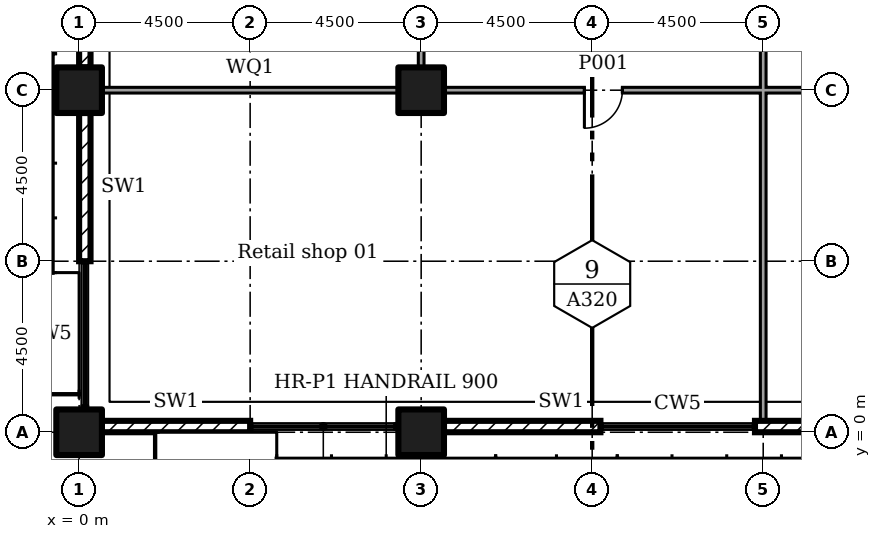
"""IFC4 building model, lengths in metres.
Left out: names, types, materials, properties, quantities, classifications, styles, units other than length and angle.
Written with IfcOpenShell. Run it as: python <this file> out.ifc"""

import sys

from ifc_helpers import new_model, si_unit, direction, frame, frame_2d, origin, origin_2d, place, context, subcontext, project, spatial, rectangle, extrude, element, fill, save


model = new_model("IFC4")
c1 = context("Model", 3, precision=1e-05, world=origin(), true_north=direction((0.0, 1.0)))
c2 = subcontext(c1, "Body", "Model", "MODEL_VIEW")
j1 = project(units=[si_unit("LENGTHUNIT", "METRE"), si_unit("PLANEANGLEUNIT", "RADIAN")], contexts=[c1])
p1 = place(None, origin())
s1 = spatial("IfcSite", under=j1, at=p1, CompositionType="ELEMENT")
p2 = place(p1, origin())
s2 = spatial("IfcBuilding", under=s1, at=p2, CompositionType="ELEMENT")
p3 = place(p2, origin())
s3 = spatial("IfcBuildingStorey", under=s2, at=p3, CompositionType="ELEMENT", Elevation=0.0)
for number, where in (
    (1, (0.0, 0.0, 0.0)),
    (2, (0.0, 9.0, 0.0)),
    (3, (9.0, 0.0, 0.0)),
    (4, (9.0, 9.0, 0.0)),
):
    element("IfcColumn", number, at=place(p3, frame(where)), inside=s3, PredefinedType="COLUMN", context=c2, shape_type="SweptSolid", body=[
        extrude(rectangle(XDim=1.2, YDim=1.2, at=origin_2d()), origin(), (0.0, 0.0, 1.0), 6.0),
    ])
p4 = place(p3, frame((0.6, 0.15, 0.0)))
e5 = element("IfcWall", 5, at=p4, inside=s3, PredefinedType="ELEMENTEDWALL", context=c2, shape_type="SweptSolid", body=[
    extrude(rectangle(XDim=3.9, YDim=0.3, at=frame_2d((1.95, 0.0))), origin(), (0.0, 0.0, 1.0), 5.55),
])
for number, where in (
    (6, (9.6, 0.15, 0.0)),
    (7, (17.783, 0.15, 0.0)),
):
    element("IfcWall", number, at=place(p3, frame(where)), inside=s3, PredefinedType="ELEMENTEDWALL", context=c2, shape_type="SweptSolid", body=[
        extrude(rectangle(XDim=4.116, YDim=0.3, at=frame_2d((2.058, 0.0))), origin(), (0.0, 0.0, 1.0), 5.55),
    ])
p5 = place(p3, frame((0.15, 13.717, 0.0), z_axis=(0.0, 0.0, 1.0), x_axis=(0.0, -1.0, 0.0)))
e8 = element("IfcWall", 8, at=p5, inside=s3, PredefinedType="ELEMENTEDWALL", context=c2, shape_type="SweptSolid", body=[
    extrude(rectangle(XDim=4.116, YDim=0.3, at=frame_2d((2.058, 0.0))), origin(), (0.0, 0.0, 1.0), 5.55),
])
p6 = place(p3, frame((0.15, 8.4, 0.0), z_axis=(0.0, 0.0, 1.0), x_axis=(0.0, -1.0, 0.0)))
e9 = element("IfcWall", 9, at=p6, inside=s3, PredefinedType="ELEMENTEDWALL", context=c2, shape_type="SweptSolid", body=[
    extrude(rectangle(XDim=3.9, YDim=0.3, at=frame_2d((1.95, 0.0))), origin(), (0.0, 0.0, 1.0), 5.55),
])
p7 = place(p3, frame((18.0, 0.3, 0.0), z_axis=(0.0, 0.0, 1.0), x_axis=(0.0, 1.0, 0.0)))
e10 = element("IfcWall", 10, at=p7, inside=s3, PredefinedType="PARTITIONING", context=c2, shape_type="SweptSolid", body=[
    extrude(rectangle(XDim=8.775, YDim=0.15, at=frame_2d((4.387, 0.0))), origin(), (0.0, 0.0, 1.0), 5.55),
])
p8 = place(p3, frame((9.595, 9.0, 0.0)))
e11 = element("IfcWall", 11, at=p8, inside=s3, PredefinedType="PARTITIONING", context=c2, shape_type="SweptSolid", body=[
    extrude(rectangle(XDim=8.48, YDim=0.15, at=frame_2d((4.24, 0.0))), origin(), (0.0, 0.0, 1.0), 5.55),
])
p9 = place(p8, frame((3.7, 0.0, 0.0)))
e12 = element("IfcOpeningElement", 12, at=p9, cuts=e11, PredefinedType="OPENING", context=c2, shape_type="SweptSolid", body=[
    extrude(rectangle(XDim=1.0, YDim=2.1, at=frame_2d((0.5, 1.05))), frame((0.0, 0.085, 0.0), z_axis=(0.0, -1.0, 0.0), x_axis=(1.0, 0.0, 0.0)), (0.0, 0.0, 1.0), 0.17),
])
p10 = place(p3, frame((0.595, 9.0, 0.0)))
e13 = element("IfcWall", 13, at=p10, inside=s3, PredefinedType="PARTITIONING", context=c2, shape_type="SweptSolid", body=[
    extrude(rectangle(XDim=7.81, YDim=0.15, at=frame_2d((3.905, 0.0))), origin(), (0.0, 0.0, 1.0), 5.55),
])
p11 = place(p3, frame((18.075, 9.0, 0.0)))
e14 = element("IfcWall", 14, at=p11, inside=s3, PredefinedType="PARTITIONING", context=c2, shape_type="SweptSolid", body=[
    extrude(rectangle(XDim=3.83, YDim=0.15, at=frame_2d((1.915, 0.0))), origin(), (0.0, 0.0, 1.0), 5.55),
])
p12 = place(p3, frame((18.0, 9.075, 0.0), z_axis=(0.0, 0.0, 1.0), x_axis=(0.0, 1.0, 0.0)))
e15 = element("IfcWall", 15, at=p12, inside=s3, PredefinedType="PARTITIONING", context=c2, shape_type="SweptSolid", body=[
    extrude(rectangle(XDim=9.0, YDim=0.15, at=frame_2d((4.5, 0.0))), origin(), (0.0, 0.0, 1.0), 5.55),
])
p13 = place(p12, frame((3.525, 0.0, 0.0)))
e16 = element("IfcOpeningElement", 16, at=p13, cuts=e15, PredefinedType="OPENING", context=c2, shape_type="SweptSolid", body=[
    extrude(rectangle(XDim=1.8, YDim=2.1, at=frame_2d((0.9, 1.05))), frame((0.0, 0.085, 0.0), z_axis=(0.0, -1.0, 0.0), x_axis=(1.0, 0.0, 0.0)), (0.0, 0.0, 1.0), 0.17),
])
p14 = place(p3, frame((9.0, 9.595, 0.0), z_axis=(0.0, 0.0, 1.0), x_axis=(0.0, 1.0, 0.0)))
e17 = element("IfcWall", 17, at=p14, inside=s3, PredefinedType="PARTITIONING", context=c2, shape_type="SweptSolid", body=[
    extrude(rectangle(XDim=12.31, YDim=0.15, at=frame_2d((6.155, 0.0))), origin(), (0.0, 0.0, 1.0), 5.55),
])
p15 = place(p14, frame((5.65, 0.0, 0.0)))
e18 = element("IfcOpeningElement", 18, at=p15, cuts=e17, PredefinedType="OPENING", context=c2, shape_type="SweptSolid", body=[
    extrude(rectangle(XDim=1.0, YDim=2.1, at=frame_2d((0.5, 1.05))), frame((0.0, 0.085, 0.0), z_axis=(0.0, -1.0, 0.0), x_axis=(1.0, 0.0, 0.0)), (0.0, 0.0, 1.0), 0.17),
])
p16 = place(p9, frame((1.0, 0.0, 0.0), x_axis=(-1.0, 0.0, 0.0)))
e19 = element("IfcDoor", 19, at=p16, inside=s3, OperationType="SINGLE_SWING_LEFT", PredefinedType="DOOR", context=c2, shape_type="SweptSolid", body=[
    extrude(rectangle(XDim=1.0, YDim=2.1, at=frame_2d((0.5, 1.05))), frame((0.0, 0.025, 0.0), z_axis=(0.0, -1.0, 0.0), x_axis=(1.0, 0.0, 0.0)), (0.0, 0.0, 1.0), 0.05),
])
fill(e12, e19)
save(model, sys.argv[1])
